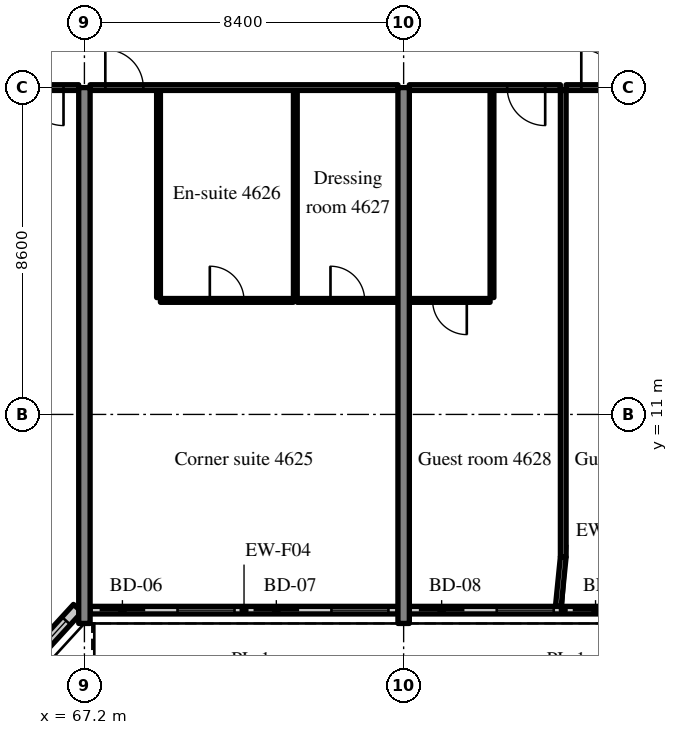
"""IFC4 building model, lengths in metres.
Left out: names, types, materials, properties, quantities, classifications, styles, units other than length and angle.
Written with IfcOpenShell. Run it as: python <this file> out.ifc"""

import sys

from ifc_helpers import new_model, si_unit, direction, frame, frame_2d, origin, place, context, subcontext, project, spatial, rectangle, extrude, source, transform, mapped, element, fill, save


model = new_model("IFC4")
c1 = context("Model", 3, precision=1e-05, world=origin(), true_north=direction((0.0, 1.0)))
c2 = subcontext(c1, "Body", "Model", "MODEL_VIEW")
j1 = project(units=[si_unit("LENGTHUNIT", "METRE"), si_unit("PLANEANGLEUNIT", "RADIAN")], contexts=[c1])
p1 = place(None, origin())
s1 = spatial("IfcSite", under=j1, at=p1, CompositionType="ELEMENT")
p2 = place(p1, origin())
s2 = spatial("IfcBuilding", under=s1, at=p2, CompositionType="ELEMENT")
p3 = place(p2, frame((0.0, 0.0, 189.6)))
s3 = spatial("IfcBuildingStorey", under=s2, at=p3, CompositionType="ELEMENT", Elevation=189.6)
m1 = source(origin(), c2, "Body", "SweptSolid", [
    extrude(rectangle(XDim=14.1, YDim=0.3, at=frame_2d((7.05, 0.0))), origin(), (0.0, 0.0, 1.0), 3.52),
])
for number, where, z_axis, x_axis in (
    (1, (67.2, 5.5, 0.0), (0.0, 0.0, 1.0), (0.0, 1.0, 0.0)),
    (2, (75.6, 5.5, 0.0), (0.0, 0.0, 1.0), (0.0, 1.0, 0.0)),
):
    element("IfcWall", number, at=place(p3, frame(where, z_axis=z_axis, x_axis=x_axis)), inside=s3, PredefinedType="SHEAR", context=c2, shape_type="MappedRepresentation", body=[
        mapped(m1, transform((0.0, 0.0, 0.0), scale=1.0)),
    ])
m2 = source(origin(), c2, "Body", "SweptSolid", [
    extrude(rectangle(XDim=2.398, YDim=0.3, at=frame_2d((1.199, 0.0))), origin(), (0.0, 0.0, 1.0), 3.52),
])
p4 = place(p3, frame((65.404, 4.131, 0.0), z_axis=(0.0, 0.0, 1.0), x_axis=(0.675374189419, 0.737475222815, 0.0)))
e3 = element("IfcWall", 3, at=p4, inside=s3, PredefinedType="SOLIDWALL", context=c2, shape_type="MappedRepresentation", body=[
    mapped(m2, transform((0.0, 0.0, 0.0), scale=1.0)),
])
m3 = source(origin(), c2, "Body", "SweptSolid", [
    extrude(rectangle(XDim=1.5, YDim=2.0, at=frame_2d((0.75, 1.0))), frame((0.0, 0.16, 0.0), z_axis=(0.0, -1.0, 0.0), x_axis=(1.0, 0.0, 0.0)), (0.0, 0.0, 1.0), 0.32),
])
p5 = place(p4, frame((0.449, 0.0, 0.9)))
e4 = element("IfcOpeningElement", 4, at=p5, cuts=e3, PredefinedType="OPENING", context=c2, shape_type="MappedRepresentation", body=[
    mapped(m3, transform((0.0, 0.0, 0.0), scale=1.0)),
])
m4 = source(origin(), c2, "Body", "SweptSolid", [
    extrude(rectangle(XDim=8.1, YDim=0.2, at=frame_2d((4.05, 0.0))), origin(), (0.0, 0.0, 1.0), 2.87),
])
p6 = place(p3, frame((67.35, 5.85, 0.0), z_axis=(0.0, 0.0, 1.0), x_axis=(1.0, 0.0, 0.0)))
e5 = element("IfcWall", 5, at=p6, inside=s3, PredefinedType="SOLIDWALL", context=c2, shape_type="MappedRepresentation", body=[
    mapped(m4, transform((0.0, 0.0, 0.0), scale=1.0)),
])
m5 = source(origin(), c2, "Body", "SweptSolid", [
    extrude(rectangle(XDim=1.2, YDim=2.4, at=frame_2d((0.6, 1.2))), frame((0.0, 0.11, 0.0), z_axis=(0.0, -1.0, 0.0), x_axis=(1.0, 0.0, 0.0)), (0.0, 0.0, 1.0), 0.22),
])
p7 = place(p6, frame((0.25, 0.0, 0.0)))
e6 = element("IfcOpeningElement", 6, at=p7, cuts=e5, PredefinedType="OPENING", context=c2, shape_type="MappedRepresentation", body=[
    mapped(m5, transform((0.0, 0.0, 0.0), scale=1.0)),
])
m6 = source(origin(), c2, "Body", "SweptSolid", [
    extrude(rectangle(XDim=1.5, YDim=1.5, at=frame_2d((0.75, 0.75))), frame((0.0, 0.11, 0.0), z_axis=(0.0, -1.0, 0.0), x_axis=(1.0, 0.0, 0.0)), (0.0, 0.0, 1.0), 0.22),
])
p8 = place(p6, frame((2.3, 0.0, 0.9)))
e7 = element("IfcOpeningElement", 7, at=p8, cuts=e5, PredefinedType="OPENING", context=c2, shape_type="MappedRepresentation", body=[
    mapped(m6, transform((0.0, 0.0, 0.0), scale=1.0)),
])
p9 = place(p6, frame((4.3, 0.0, 0.0)))
e8 = element("IfcOpeningElement", 8, at=p9, cuts=e5, PredefinedType="OPENING", context=c2, shape_type="MappedRepresentation", body=[
    mapped(m5, transform((0.0, 0.0, 0.0), scale=1.0)),
])
p10 = place(p6, frame((6.35, 0.0, 0.9)))
e9 = element("IfcOpeningElement", 9, at=p10, cuts=e5, PredefinedType="OPENING", context=c2, shape_type="MappedRepresentation", body=[
    mapped(m6, transform((0.0, 0.0, 0.0), scale=1.0)),
])
m7 = source(origin(), c2, "Body", "SweptSolid", [
    extrude(rectangle(XDim=8.1, YDim=0.2, at=frame_2d((4.05, 0.0))), origin(), (0.0, 0.0, 1.0), 2.87),
])
p11 = place(p3, frame((75.75, 5.85, 0.0), z_axis=(0.0, 0.0, 1.0), x_axis=(1.0, 0.0, 0.0)))
e10 = element("IfcWall", 10, at=p11, inside=s3, PredefinedType="SOLIDWALL", context=c2, shape_type="MappedRepresentation", body=[
    mapped(m7, transform((0.0, 0.0, 0.0), scale=1.0)),
])
p12 = place(p11, frame((0.25, 0.0, 0.0)))
e11 = element("IfcOpeningElement", 11, at=p12, cuts=e10, PredefinedType="OPENING", context=c2, shape_type="MappedRepresentation", body=[
    mapped(m5, transform((0.0, 0.0, 0.0), scale=1.0)),
])
p13 = place(p11, frame((2.3, 0.0, 0.9)))
e12 = element("IfcOpeningElement", 12, at=p13, cuts=e10, PredefinedType="OPENING", context=c2, shape_type="MappedRepresentation", body=[
    mapped(m6, transform((0.0, 0.0, 0.0), scale=1.0)),
])
p14 = place(p11, frame((4.3, 0.0, 0.0)))
e13 = element("IfcOpeningElement", 13, at=p14, cuts=e10, PredefinedType="OPENING", context=c2, shape_type="MappedRepresentation", body=[
    mapped(m5, transform((0.0, 0.0, 0.0), scale=1.0)),
])
p15 = place(p11, frame((6.35, 0.0, 0.9)))
e14 = element("IfcOpeningElement", 14, at=p15, cuts=e10, PredefinedType="OPENING", context=c2, shape_type="MappedRepresentation", body=[
    mapped(m6, transform((0.0, 0.0, 0.0), scale=1.0)),
])
m8 = source(origin(), c2, "Body", "SweptSolid", [
    extrude(rectangle(XDim=8.1, YDim=0.15, at=frame_2d((4.05, 0.0))), origin(), (0.0, 0.0, 1.0), 2.82),
])
p16 = place(p3, frame((58.95, 19.6, 0.0), z_axis=(0.0, 0.0, 1.0), x_axis=(1.0, 0.0, 0.0)))
e15 = element("IfcWall", 15, at=p16, inside=s3, PredefinedType="PARTITIONING", context=c2, shape_type="MappedRepresentation", body=[
    mapped(m8, transform((0.0, 0.0, 0.0), scale=1.0)),
])
m9 = source(origin(), c2, "Body", "SweptSolid", [
    extrude(rectangle(XDim=1.0, YDim=2.1, at=frame_2d((0.5, 1.05))), frame((0.0, 0.085, 0.0), z_axis=(0.0, -1.0, 0.0), x_axis=(1.0, 0.0, 0.0)), (0.0, 0.0, 1.0), 0.17),
])
p17 = place(p16, frame((6.7, 0.0, 0.0)))
e16 = element("IfcOpeningElement", 16, at=p17, cuts=e15, PredefinedType="OPENING", context=c2, shape_type="MappedRepresentation", body=[
    mapped(m9, transform((0.0, 0.0, 0.0), scale=1.0)),
])
m10 = source(origin(), c2, "Body", "SweptSolid", [
    extrude(rectangle(XDim=5.45, YDim=0.1, at=frame_2d((2.725, 0.0))), origin(), (0.0, 0.0, 1.0), 3.52),
])
for number, where, z_axis, x_axis in (
    (17, (69.15, 14.075, 0.0), (0.0, 0.0, 1.0), (0.0, 1.0, 0.0)),
    (18, (72.75, 14.075, 0.0), (0.0, 0.0, 1.0), (0.0, 1.0, 0.0)),
):
    element("IfcWall", number, at=place(p3, frame(where, z_axis=z_axis, x_axis=x_axis)), inside=s3, PredefinedType="PARTITIONING", context=c2, shape_type="MappedRepresentation", body=[
        mapped(m10, transform((0.0, 0.0, 0.0), scale=1.0)),
    ])
m11 = source(origin(), c2, "Body", "SweptSolid", [
    extrude(rectangle(XDim=3.5, YDim=0.1, at=frame_2d((1.75, 0.0))), origin(), (0.0, 0.0, 1.0), 3.52),
])
p18 = place(p3, frame((69.2, 14.0, 0.0), z_axis=(0.0, 0.0, 1.0), x_axis=(1.0, 0.0, 0.0)))
e19 = element("IfcWall", 19, at=p18, inside=s3, PredefinedType="PARTITIONING", context=c2, shape_type="MappedRepresentation", body=[
    mapped(m11, transform((0.0, 0.0, 0.0), scale=1.0)),
])
m12 = source(origin(), c2, "Body", "SweptSolid", [
    extrude(rectangle(XDim=0.9, YDim=2.1, at=frame_2d((0.45, 1.05))), frame((0.0, 0.06, 0.0), z_axis=(0.0, -1.0, 0.0), x_axis=(1.0, 0.0, 0.0)), (0.0, 0.0, 1.0), 0.12),
])
p19 = place(p18, frame((1.3, 0.0, 0.0)))
e20 = element("IfcOpeningElement", 20, at=p19, cuts=e19, PredefinedType="OPENING", context=c2, shape_type="MappedRepresentation", body=[
    mapped(m12, transform((0.0, 0.0, 0.0), scale=1.0)),
])
m13 = source(origin(), c2, "Body", "SweptSolid", [
    extrude(rectangle(XDim=2.65, YDim=0.1, at=frame_2d((1.325, 0.0))), origin(), (0.0, 0.0, 1.0), 3.52),
])
p20 = place(p3, frame((72.8, 14.0, 0.0), z_axis=(0.0, 0.0, 1.0), x_axis=(1.0, 0.0, 0.0)))
e21 = element("IfcWall", 21, at=p20, inside=s3, PredefinedType="PARTITIONING", context=c2, shape_type="MappedRepresentation", body=[
    mapped(m13, transform((0.0, 0.0, 0.0), scale=1.0)),
])
p21 = place(p20, frame((0.875, 0.0, 0.0)))
e22 = element("IfcOpeningElement", 22, at=p21, cuts=e21, PredefinedType="OPENING", context=c2, shape_type="MappedRepresentation", body=[
    mapped(m12, transform((0.0, 0.0, 0.0), scale=1.0)),
])
m14 = source(origin(), c2, "Body", "SweptSolid", [
    extrude(rectangle(XDim=8.1, YDim=0.15, at=frame_2d((4.05, 0.0))), origin(), (0.0, 0.0, 1.0), 2.82),
])
p22 = place(p3, frame((67.35, 19.6, 0.0), z_axis=(0.0, 0.0, 1.0), x_axis=(1.0, 0.0, 0.0)))
e23 = element("IfcWall", 23, at=p22, inside=s3, PredefinedType="PARTITIONING", context=c2, shape_type="MappedRepresentation", body=[
    mapped(m14, transform((0.0, 0.0, 0.0), scale=1.0)),
])
p23 = place(p22, frame((0.4, 0.0, 0.0)))
e24 = element("IfcOpeningElement", 24, at=p23, cuts=e23, PredefinedType="OPENING", context=c2, shape_type="MappedRepresentation", body=[
    mapped(m9, transform((0.0, 0.0, 0.0), scale=1.0)),
])
p24 = place(p3, frame((77.925, 14.075, 0.0), z_axis=(0.0, 0.0, 1.0), x_axis=(0.0, 1.0, 0.0)))
e25 = element("IfcWall", 25, at=p24, inside=s3, PredefinedType="PARTITIONING", context=c2, shape_type="MappedRepresentation", body=[
    mapped(m10, transform((0.0, 0.0, 0.0), scale=1.0)),
])
m15 = source(origin(), c2, "Body", "SweptSolid", [
    extrude(rectangle(XDim=2.125, YDim=0.1, at=frame_2d((1.062, 0.0))), origin(), (0.0, 0.0, 1.0), 3.52),
])
p25 = place(p3, frame((75.75, 14.0, 0.0), z_axis=(0.0, 0.0, 1.0), x_axis=(1.0, 0.0, 0.0)))
e26 = element("IfcWall", 26, at=p25, inside=s3, PredefinedType="PARTITIONING", context=c2, shape_type="MappedRepresentation", body=[
    mapped(m15, transform((0.0, 0.0, 0.0), scale=1.0)),
])
p26 = place(p25, frame((0.612, 0.0, 0.0)))
e27 = element("IfcOpeningElement", 27, at=p26, cuts=e26, PredefinedType="OPENING", context=c2, shape_type="MappedRepresentation", body=[
    mapped(m12, transform((0.0, 0.0, 0.0), scale=1.0)),
])
m16 = source(origin(), c2, "Body", "SweptSolid", [
    extrude(rectangle(XDim=3.975, YDim=0.15, at=frame_2d((1.988, 0.0))), origin(), (0.0, 0.0, 1.0), 2.82),
])
p27 = place(p3, frame((75.75, 19.6, 0.0), z_axis=(0.0, 0.0, 1.0), x_axis=(1.0, 0.0, 0.0)))
e28 = element("IfcWall", 28, at=p27, inside=s3, PredefinedType="PARTITIONING", context=c2, shape_type="MappedRepresentation", body=[
    mapped(m16, transform((0.0, 0.0, 0.0), scale=1.0)),
])
p28 = place(p27, frame((2.575, 0.0, 0.0)))
e29 = element("IfcOpeningElement", 29, at=p28, cuts=e28, PredefinedType="OPENING", context=c2, shape_type="MappedRepresentation", body=[
    mapped(m9, transform((0.0, 0.0, 0.0), scale=1.0)),
])
p29 = place(p3, frame((79.875, 19.6, 0.0), z_axis=(0.0, 0.0, 1.0), x_axis=(1.0, 0.0, 0.0)))
e30 = element("IfcWall", 30, at=p29, inside=s3, PredefinedType="PARTITIONING", context=c2, shape_type="MappedRepresentation", body=[
    mapped(m16, transform((0.0, 0.0, 0.0), scale=1.0)),
])
p30 = place(p29, frame((0.4, 0.0, 0.0)))
e31 = element("IfcOpeningElement", 31, at=p30, cuts=e30, PredefinedType="OPENING", context=c2, shape_type="MappedRepresentation", body=[
    mapped(m9, transform((0.0, 0.0, 0.0), scale=1.0)),
])
m17 = source(origin(), c2, "Body", "SweptSolid", [
    extrude(rectangle(XDim=12.275, YDim=0.15, at=frame_2d((6.137, 0.0))), origin(), (0.0, 0.0, 1.0), 3.52),
])
p31 = place(p3, frame((79.8, 7.25, 0.0), z_axis=(0.0, 0.0, 1.0), x_axis=(0.0, 1.0, 0.0)))
e32 = element("IfcWall", 32, at=p31, inside=s3, PredefinedType="PARTITIONING", context=c2, shape_type="MappedRepresentation", body=[
    mapped(m17, transform((0.0, 0.0, 0.0), scale=1.0)),
])
m18 = source(origin(), c2, "Body", "SweptSolid", [
    extrude(rectangle(XDim=1.307, YDim=0.15, at=frame_2d((0.653, 0.0))), origin(), (0.0, 0.0, 1.0), 3.52),
])
p32 = place(p3, frame((79.67, 5.95, 0.0), z_axis=(0.0, 0.0, 1.0), x_axis=(0.099596223396, 0.99502793543, 0.0)))
e33 = element("IfcWall", 33, at=p32, inside=s3, PredefinedType="PARTITIONING", context=c2, shape_type="MappedRepresentation", body=[
    mapped(m18, transform((0.0, 0.0, 0.0), scale=1.0)),
])
m19 = source(origin(), c2, "Body", "SweptSolid", [
    extrude(rectangle(XDim=1.5, YDim=2.0, at=frame_2d((0.75, 1.0))), frame((0.0, 0.03, 0.0), z_axis=(0.0, -1.0, 0.0), x_axis=(1.0, 0.0, 0.0)), (0.0, 0.0, 1.0), 0.06),
])
p33 = place(p5, origin())
e34 = element("IfcWindow", 34, at=p33, inside=s3, PartitioningType="SINGLE_PANEL", PredefinedType="WINDOW", context=c2, shape_type="MappedRepresentation", body=[
    mapped(m19, transform((0.0, 0.0, 0.0), scale=1.0)),
])
fill(e4, e34)
m20 = source(origin(), c2, "Body", "SweptSolid", [
    extrude(rectangle(XDim=1.2, YDim=2.4, at=frame_2d((0.6, 1.2))), frame((0.0, 0.025, 0.0), z_axis=(0.0, -1.0, 0.0), x_axis=(1.0, 0.0, 0.0)), (0.0, 0.0, 1.0), 0.05),
])
p34 = place(p7, origin())
e35 = element("IfcDoor", 35, at=p34, inside=s3, OperationType="SLIDING_TO_RIGHT", PredefinedType="DOOR", context=c2, shape_type="MappedRepresentation", body=[
    mapped(m20, transform((0.0, 0.0, 0.0), scale=1.0)),
])
fill(e6, e35)
m21 = source(origin(), c2, "Body", "SweptSolid", [
    extrude(rectangle(XDim=1.5, YDim=1.5, at=frame_2d((0.75, 0.75))), frame((0.0, 0.03, 0.0), z_axis=(0.0, -1.0, 0.0), x_axis=(1.0, 0.0, 0.0)), (0.0, 0.0, 1.0), 0.06),
])
p35 = place(p8, origin())
e36 = element("IfcWindow", 36, at=p35, inside=s3, PartitioningType="SINGLE_PANEL", PredefinedType="WINDOW", context=c2, shape_type="MappedRepresentation", body=[
    mapped(m21, transform((0.0, 0.0, 0.0), scale=1.0)),
])
fill(e7, e36)
p36 = place(p9, origin())
e37 = element("IfcDoor", 37, at=p36, inside=s3, OperationType="SLIDING_TO_LEFT", PredefinedType="DOOR", context=c2, shape_type="MappedRepresentation", body=[
    mapped(m20, transform((0.0, 0.0, 0.0), scale=1.0)),
])
fill(e8, e37)
p37 = place(p10, origin())
e38 = element("IfcWindow", 38, at=p37, inside=s3, PartitioningType="SINGLE_PANEL", PredefinedType="WINDOW", context=c2, shape_type="MappedRepresentation", body=[
    mapped(m21, transform((0.0, 0.0, 0.0), scale=1.0)),
])
fill(e9, e38)
p38 = place(p12, origin())
e39 = element("IfcDoor", 39, at=p38, inside=s3, OperationType="SLIDING_TO_RIGHT", PredefinedType="DOOR", context=c2, shape_type="MappedRepresentation", body=[
    mapped(m20, transform((0.0, 0.0, 0.0), scale=1.0)),
])
fill(e11, e39)
p39 = place(p13, origin())
e40 = element("IfcWindow", 40, at=p39, inside=s3, PartitioningType="SINGLE_PANEL", PredefinedType="WINDOW", context=c2, shape_type="MappedRepresentation", body=[
    mapped(m21, transform((0.0, 0.0, 0.0), scale=1.0)),
])
fill(e12, e40)
p40 = place(p14, origin())
e41 = element("IfcDoor", 41, at=p40, inside=s3, OperationType="SLIDING_TO_LEFT", PredefinedType="DOOR", context=c2, shape_type="MappedRepresentation", body=[
    mapped(m20, transform((0.0, 0.0, 0.0), scale=1.0)),
])
fill(e13, e41)
m22 = source(origin(), c2, "Body", "SweptSolid", [
    extrude(rectangle(XDim=1.0, YDim=2.1, at=frame_2d((0.5, 1.05))), frame((0.0, 0.025, 0.0), z_axis=(0.0, -1.0, 0.0), x_axis=(1.0, 0.0, 0.0)), (0.0, 0.0, 1.0), 0.05),
])
p41 = place(p17, origin())
e42 = element("IfcDoor", 42, at=p41, inside=s3, OperationType="SINGLE_SWING_RIGHT", PredefinedType="DOOR", context=c2, shape_type="MappedRepresentation", body=[
    mapped(m22, transform((0.0, 0.0, 0.0), scale=1.0)),
])
fill(e16, e42)
m23 = source(origin(), c2, "Body", "SweptSolid", [
    extrude(rectangle(XDim=0.9, YDim=2.1, at=frame_2d((0.45, 1.05))), frame((0.0, 0.025, 0.0), z_axis=(0.0, -1.0, 0.0), x_axis=(1.0, 0.0, 0.0)), (0.0, 0.0, 1.0), 0.05),
])
p42 = place(p19, origin())
e43 = element("IfcDoor", 43, at=p42, inside=s3, OperationType="SINGLE_SWING_LEFT", PredefinedType="DOOR", context=c2, shape_type="MappedRepresentation", body=[
    mapped(m23, transform((0.0, 0.0, 0.0), scale=1.0)),
])
fill(e20, e43)
p43 = place(p21, origin())
e44 = element("IfcDoor", 44, at=p43, inside=s3, OperationType="SINGLE_SWING_LEFT", PredefinedType="DOOR", context=c2, shape_type="MappedRepresentation", body=[
    mapped(m23, transform((0.0, 0.0, 0.0), scale=1.0)),
])
fill(e22, e44)
p44 = place(p23, origin())
e45 = element("IfcDoor", 45, at=p44, inside=s3, OperationType="SINGLE_SWING_LEFT", PredefinedType="DOOR", context=c2, shape_type="MappedRepresentation", body=[
    mapped(m22, transform((0.0, 0.0, 0.0), scale=1.0)),
])
fill(e24, e45)
p45 = place(p26, origin())
e46 = element("IfcDoor", 46, at=p45, inside=s3, OperationType="SINGLE_SWING_RIGHT", PredefinedType="DOOR", context=c2, shape_type="MappedRepresentation", body=[
    mapped(m23, transform((0.0, 0.0, 0.0), scale=1.0)),
])
fill(e27, e46)
p46 = place(p28, origin())
e47 = element("IfcDoor", 47, at=p46, inside=s3, OperationType="SINGLE_SWING_RIGHT", PredefinedType="DOOR", context=c2, shape_type="MappedRepresentation", body=[
    mapped(m22, transform((0.0, 0.0, 0.0), scale=1.0)),
])
fill(e29, e47)
p47 = place(p30, origin())
e48 = element("IfcDoor", 48, at=p47, inside=s3, OperationType="SINGLE_SWING_LEFT", PredefinedType="DOOR", context=c2, shape_type="MappedRepresentation", body=[
    mapped(m22, transform((0.0, 0.0, 0.0), scale=1.0)),
])
fill(e31, e48)
save(model, sys.argv[1])
